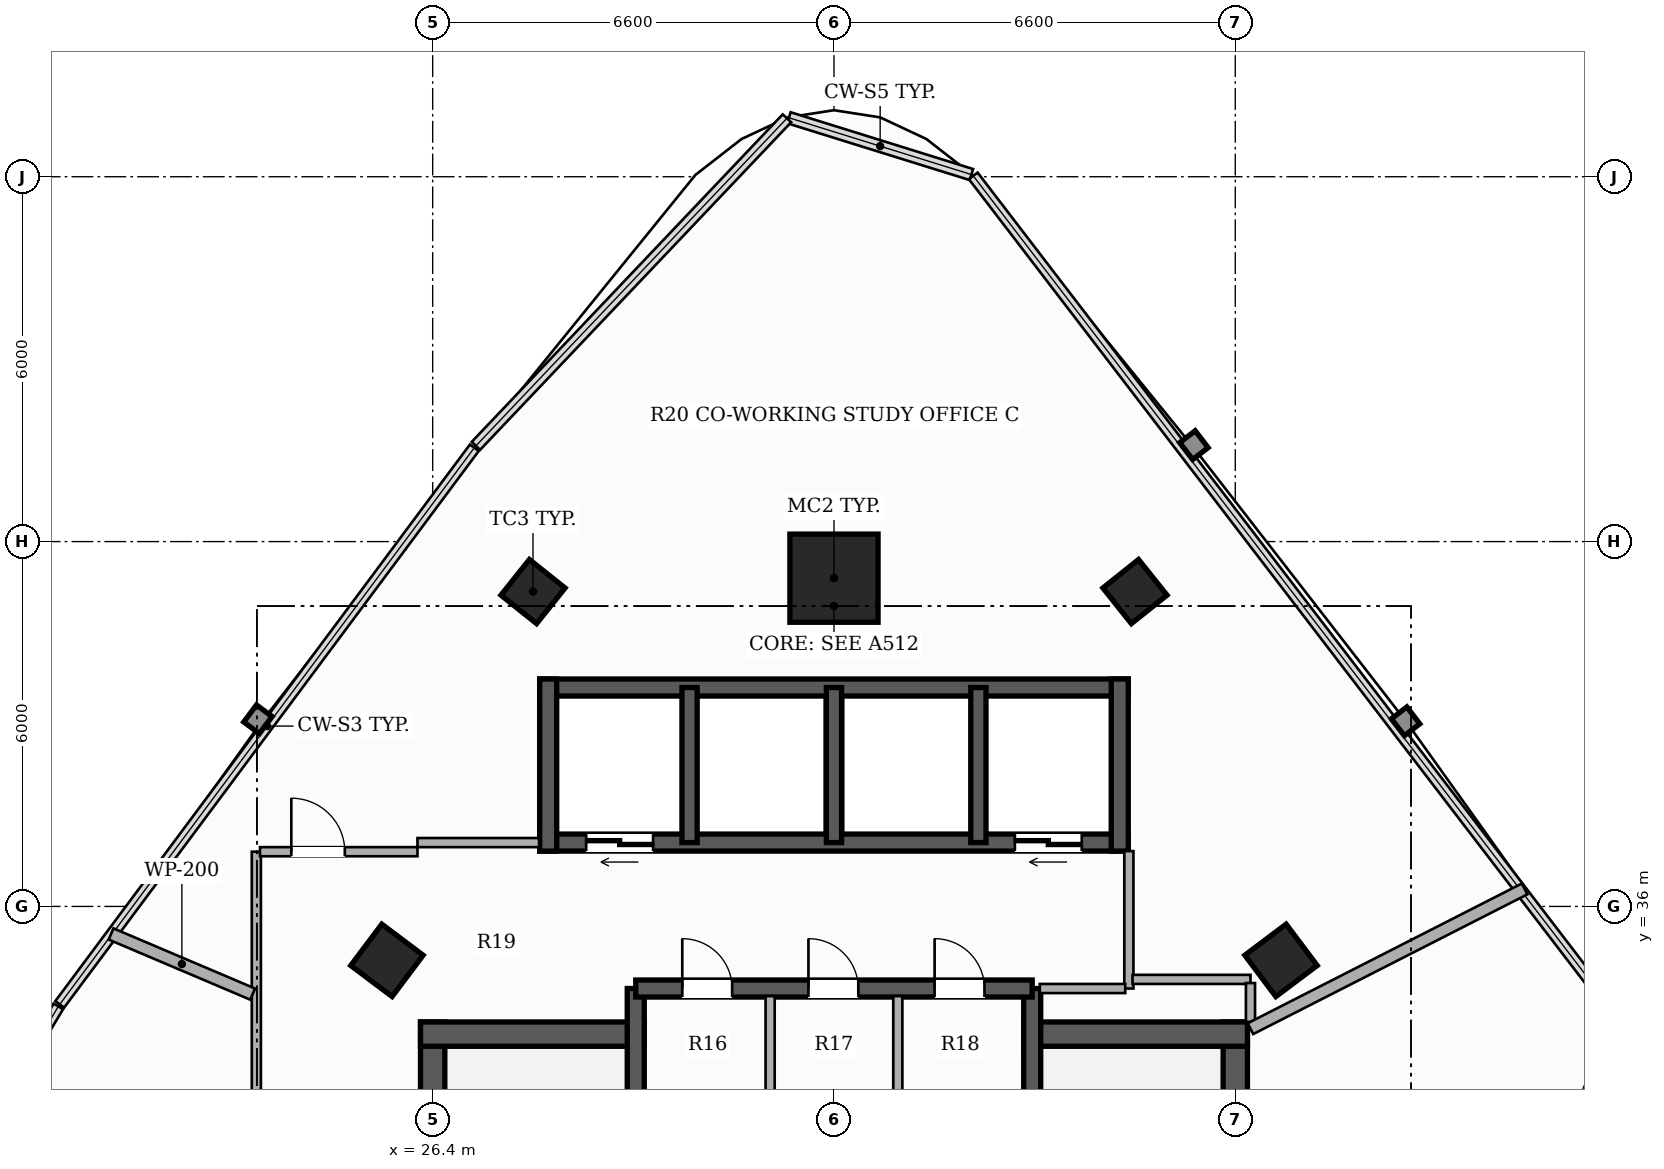
"""IFC4 building model, lengths in metres.
Left out: names, types, materials, properties, quantities, classifications, styles, units other than length and angle.
Written with IfcOpenShell. Run it as: python <this file> out.ifc"""

import sys

from ifc_helpers import new_model, si_unit, direction, frame, frame_2d, origin, origin_2d, place, context, subcontext, project, spatial, rectangle, hollow_rectangle, extrude, element, fill, save


model = new_model("IFC4")
c1 = context("Model", 3, precision=1e-05, world=origin(), true_north=direction((0.0, 1.0)))
c2 = subcontext(c1, "Body", "Model", "MODEL_VIEW")
j1 = project(units=[si_unit("LENGTHUNIT", "METRE"), si_unit("PLANEANGLEUNIT", "RADIAN")], contexts=[c1])
p1 = place(None, origin())
s1 = spatial("IfcSite", under=j1, at=p1, CompositionType="ELEMENT")
p2 = place(p1, origin())
s2 = spatial("IfcBuilding", under=s1, at=p2, CompositionType="ELEMENT")
p3 = place(p2, frame((0.0, 0.0, 126.5)))
s3 = spatial("IfcBuildingStorey", under=s2, at=p3, CompositionType="ELEMENT", Elevation=126.5)
p4 = place(p3, frame((26.4, 26.5, 0.0), z_axis=(0.0, 0.0, 1.0), x_axis=(0.0, 1.0, 0.0)))
e1 = element("IfcWall", 1, at=p4, inside=s3, PredefinedType="SHEAR", context=c2, shape_type="SweptSolid", body=[
    extrude(rectangle(XDim=7.6, YDim=0.4, at=frame_2d((3.8, 0.0))), origin(), (0.0, 0.0, 1.0), 3.3),
])
p5 = place(p3, frame((26.2, 33.9, 0.0), z_axis=(0.0, 0.0, 1.0), x_axis=(1.0, 0.0, 0.0)))
e2 = element("IfcWall", 2, at=p5, inside=s3, PredefinedType="SHEAR", context=c2, shape_type="SweptSolid", body=[
    extrude(rectangle(XDim=3.68, YDim=0.4, at=frame_2d((1.84, 0.0))), origin(), (0.0, 0.0, 1.0), 3.3),
])
p6 = place(p3, frame((39.6, 26.5, 0.0), z_axis=(0.0, 0.0, 1.0), x_axis=(0.0, 1.0, 0.0)))
e3 = element("IfcWall", 3, at=p6, inside=s3, PredefinedType="SHEAR", context=c2, shape_type="SweptSolid", body=[
    extrude(rectangle(XDim=7.6, YDim=0.4, at=frame_2d((3.8, 0.0))), origin(), (0.0, 0.0, 1.0), 3.3),
])
p7 = place(p3, frame((36.12, 33.9, 0.0), z_axis=(0.0, 0.0, 1.0), x_axis=(1.0, 0.0, 0.0)))
e4 = element("IfcWall", 4, at=p7, inside=s3, PredefinedType="SHEAR", context=c2, shape_type="SweptSolid", body=[
    extrude(rectangle(XDim=3.68, YDim=0.4, at=frame_2d((1.84, 0.0))), origin(), (0.0, 0.0, 1.0), 3.3),
])
p8 = place(p3, frame((29.74, 26.5, 0.0), z_axis=(0.0, 0.0, 1.0), x_axis=(0.0, 1.0, 0.0)))
e5 = element("IfcWall", 5, at=p8, inside=s3, PredefinedType="SHEAR", context=c2, shape_type="SweptSolid", body=[
    extrude(rectangle(XDim=8.15, YDim=0.28, at=frame_2d((4.075, 0.0))), origin(), (0.0, 0.0, 1.0), 3.3),
])
p9 = place(p8, frame((0.6, 0.0, 0.0)))
e6 = element("IfcOpeningElement", 6, at=p9, cuts=e5, PredefinedType="OPENING", context=c2, shape_type="SweptSolid", body=[
    extrude(rectangle(XDim=1.05, YDim=2.15, at=frame_2d((0.525, 1.075))), frame((0.0, 0.15, 0.0), z_axis=(0.0, -1.0, 0.0), x_axis=(1.0, 0.0, 0.0)), (0.0, 0.0, 1.0), 0.3),
])
p10 = place(p3, frame((36.26, 26.5, 0.0), z_axis=(0.0, 0.0, 1.0), x_axis=(0.0, 1.0, 0.0)))
e7 = element("IfcWall", 7, at=p10, inside=s3, PredefinedType="SHEAR", context=c2, shape_type="SweptSolid", body=[
    extrude(rectangle(XDim=8.15, YDim=0.28, at=frame_2d((4.075, 0.0))), origin(), (0.0, 0.0, 1.0), 3.3),
])
p11 = place(p10, frame((0.6, 0.0, 0.0)))
e8 = element("IfcOpeningElement", 8, at=p11, cuts=e7, PredefinedType="OPENING", context=c2, shape_type="SweptSolid", body=[
    extrude(rectangle(XDim=1.05, YDim=2.15, at=frame_2d((0.525, 1.075))), frame((0.0, 0.15, 0.0), z_axis=(0.0, -1.0, 0.0), x_axis=(1.0, 0.0, 0.0)), (0.0, 0.0, 1.0), 0.3),
])
p12 = place(p3, frame((29.74, 34.65, 0.0), z_axis=(0.0, 0.0, 1.0), x_axis=(1.0, 0.0, 0.0)))
e9 = element("IfcWall", 9, at=p12, inside=s3, PredefinedType="SHEAR", context=c2, shape_type="SweptSolid", body=[
    extrude(rectangle(XDim=6.52, YDim=0.28, at=frame_2d((3.26, 0.0))), origin(), (0.0, 0.0, 1.0), 3.3),
])
p13 = place(p12, frame((0.765, 0.0, 0.0)))
e10 = element("IfcOpeningElement", 10, at=p13, cuts=e9, PredefinedType="OPENING", context=c2, shape_type="SweptSolid", body=[
    extrude(rectangle(XDim=0.82, YDim=2.1, at=frame_2d((0.41, 1.05))), frame((0.0, 0.15, 0.0), z_axis=(0.0, -1.0, 0.0), x_axis=(1.0, 0.0, 0.0)), (0.0, 0.0, 1.0), 0.3),
])
p14 = place(p12, frame((2.84, 0.0, 0.0)))
e11 = element("IfcOpeningElement", 11, at=p14, cuts=e9, PredefinedType="OPENING", context=c2, shape_type="SweptSolid", body=[
    extrude(rectangle(XDim=0.82, YDim=2.1, at=frame_2d((0.41, 1.05))), frame((0.0, 0.15, 0.0), z_axis=(0.0, -1.0, 0.0), x_axis=(1.0, 0.0, 0.0)), (0.0, 0.0, 1.0), 0.3),
])
p15 = place(p12, frame((4.915, 0.0, 0.0)))
e12 = element("IfcOpeningElement", 12, at=p15, cuts=e9, PredefinedType="OPENING", context=c2, shape_type="SweptSolid", body=[
    extrude(rectangle(XDim=0.82, YDim=2.1, at=frame_2d((0.41, 1.05))), frame((0.0, 0.15, 0.0), z_axis=(0.0, -1.0, 0.0), x_axis=(1.0, 0.0, 0.0)), (0.0, 0.0, 1.0), 0.3),
])
p16 = place(p3, frame((37.84, 37.05, 0.0), z_axis=(0.0, 0.0, 1.0), x_axis=(-1.0, 0.0, 0.0)))
e13 = element("IfcWall", 13, at=p16, inside=s3, PredefinedType="SHEAR", context=c2, shape_type="SweptSolid", body=[
    extrude(rectangle(XDim=9.68, YDim=0.28, at=frame_2d((4.84, 0.0))), origin(), (0.0, 0.0, 1.0), 3.3),
])
p17 = place(p16, frame((7.815, 0.0, 0.0)))
e14 = element("IfcOpeningElement", 14, at=p17, cuts=e13, PredefinedType="OPENING", context=c2, shape_type="SweptSolid", body=[
    extrude(rectangle(XDim=1.1, YDim=2.2, at=frame_2d((0.55, 1.1))), frame((0.0, 0.15, 0.0), z_axis=(0.0, -1.0, 0.0), x_axis=(1.0, 0.0, 0.0)), (0.0, 0.0, 1.0), 0.3),
])
p18 = place(p16, frame((0.765, 0.0, 0.0)))
e15 = element("IfcOpeningElement", 15, at=p18, cuts=e13, PredefinedType="OPENING", context=c2, shape_type="SweptSolid", body=[
    extrude(rectangle(XDim=1.1, YDim=2.2, at=frame_2d((0.55, 1.1))), frame((0.0, 0.15, 0.0), z_axis=(0.0, -1.0, 0.0), x_axis=(1.0, 0.0, 0.0)), (0.0, 0.0, 1.0), 0.3),
])
p19 = place(p3, frame((28.16, 39.6, 0.0), z_axis=(0.0, 0.0, 1.0), x_axis=(1.0, 0.0, 0.0)))
e16 = element("IfcWall", 16, at=p19, inside=s3, PredefinedType="SHEAR", context=c2, shape_type="SweptSolid", body=[
    extrude(rectangle(XDim=9.68, YDim=0.28, at=frame_2d((4.84, 0.0))), origin(), (0.0, 0.0, 1.0), 3.3),
])
for number, where, z_axis, x_axis in (
    (17, (28.3, 36.91, 0.0), (0.0, 0.0, 1.0), (0.0, 1.0, 0.0)),
    (18, (37.7, 36.91, 0.0), (0.0, 0.0, 1.0), (0.0, 1.0, 0.0)),
):
    element("IfcWall", number, at=place(p3, frame(where, z_axis=z_axis, x_axis=x_axis)), inside=s3, PredefinedType="SHEAR", context=c2, shape_type="SweptSolid", body=[
        extrude(rectangle(XDim=2.83, YDim=0.28, at=frame_2d((1.415, 0.0))), origin(), (0.0, 0.0, 1.0), 3.3),
    ])
for number, where, z_axis, x_axis in (
    (19, (30.625, 37.05, 0.0), (0.0, 0.0, 1.0), (0.0, 1.0, 0.0)),
    (20, (33.0, 37.05, 0.0), (0.0, 0.0, 1.0), (0.0, 1.0, 0.0)),
    (21, (35.375, 37.05, 0.0), (0.0, 0.0, 1.0), (0.0, 1.0, 0.0)),
):
    element("IfcWall", number, at=place(p3, frame(where, z_axis=z_axis, x_axis=x_axis)), inside=s3, PredefinedType="SHEAR", context=c2, shape_type="SweptSolid", body=[
        extrude(rectangle(XDim=2.55, YDim=0.25, at=frame_2d((1.275, 0.0))), origin(), (0.0, 0.0, 1.0), 3.3),
    ])
p20 = place(p3, frame((33.0, 41.398, 0.0), z_axis=(0.0, 0.0, 1.0), x_axis=(1.0, 0.0, 0.0)))
e22 = element("IfcColumn", 22, at=p20, inside=s3, PredefinedType="COLUMN", context=c2, shape_type="SweptSolid", body=[
    extrude(hollow_rectangle(XDim=1.45, YDim=1.45, WallThickness=0.045, at=origin_2d()), origin(), (0.0, 0.0, 1.0), 3.3),
])
for number, where, z_axis, x_axis in (
    (23, (25.648, 35.113, 0.0), (0.0, 0.0, 1.0), (0.6, 0.8, 0.0)),
    (24, (40.352, 35.113, 0.0), (0.0, 0.0, 1.0), (-0.6, 0.8, 0.0)),
):
    element("IfcColumn", number, at=place(p3, frame(where, z_axis=z_axis, x_axis=x_axis)), inside=s3, PredefinedType="COLUMN", context=c2, shape_type="SweptSolid", body=[
        extrude(hollow_rectangle(XDim=0.85, YDim=0.85, WallThickness=0.028, at=origin_2d()), origin(), (0.0, 0.0, 1.0), 3.3),
    ])
for number, where, z_axis, x_axis in (
    (25, (28.05, 41.178, 0.0), (0.0, 0.0, 1.0), (0.624, 0.782, 0.0)),
    (26, (37.95, 41.178, 0.0), (0.0, 0.0, 1.0), (-0.624, 0.782, 0.0)),
):
    element("IfcColumn", number, at=place(p3, frame(where, z_axis=z_axis, x_axis=x_axis)), inside=s3, PredefinedType="COLUMN", context=c2, shape_type="SweptSolid", body=[
        extrude(hollow_rectangle(XDim=0.75, YDim=0.75, WallThickness=0.025, at=origin_2d()), origin(), (0.0, 0.0, 1.0), 3.3),
    ])
p21 = place(p3, frame((37.85, 34.65, 0.0), z_axis=(0.0, 0.0, 1.0), x_axis=(0.0, 1.0, 0.0)))
e27 = element("IfcWall", 27, at=p21, inside=s3, PredefinedType="PARTITIONING", context=c2, shape_type="SweptSolid", body=[
    extrude(rectangle(XDim=2.26, YDim=0.15, at=frame_2d((1.13, 0.0))), origin(), (0.0, 0.0, 1.0), 3.06),
])
p22 = place(p3, frame((36.385, 34.65, 0.0), z_axis=(0.0, 0.0, 1.0), x_axis=(1.0, 0.0, 0.0)))
e28 = element("IfcWall", 28, at=p22, inside=s3, PredefinedType="PARTITIONING", context=c2, shape_type="SweptSolid", body=[
    extrude(rectangle(XDim=1.405, YDim=0.15, at=frame_2d((0.703, 0.0))), origin(), (0.0, 0.0, 1.0), 2.425),
])
for number, where, z_axis, x_axis in (
    (29, (31.95, 32.915, 0.0), (0.0, 0.0, 1.0), (0.0, 1.0, 0.0)),
    (30, (34.05, 32.915, 0.0), (0.0, 0.0, 1.0), (0.0, 1.0, 0.0)),
):
    element("IfcWall", number, at=place(p3, frame(where, z_axis=z_axis, x_axis=x_axis)), inside=s3, PredefinedType="PARTITIONING", context=c2, shape_type="SweptSolid", body=[
        extrude(rectangle(XDim=1.61, YDim=0.15, at=frame_2d((0.805, 0.0))), origin(), (0.0, 0.0, 1.0), 3.06),
    ])
p23 = place(p3, frame((23.5, 14.06, 0.0), z_axis=(0.0, 0.0, 1.0), x_axis=(0.0, 1.0, 0.0)))
e31 = element("IfcWall", 31, at=p23, inside=s3, PredefinedType="PARTITIONING", context=c2, shape_type="SweptSolid", body=[
    extrude(rectangle(XDim=22.84, YDim=0.15, at=frame_2d((11.42, 0.0))), origin(), (0.0, 0.0, 1.0), 2.413),
])
p24 = place(p23, frame((13.045, 0.0, 0.0)))
e32 = element("IfcOpeningElement", 32, at=p24, cuts=e31, PredefinedType="OPENING", context=c2, shape_type="SweptSolid", body=[
    extrude(rectangle(XDim=0.88, YDim=2.1, at=frame_2d((0.44, 1.05))), frame((0.0, 0.085, 0.0), z_axis=(0.0, -1.0, 0.0), x_axis=(1.0, 0.0, 0.0)), (0.0, 0.0, 1.0), 0.17),
])
p25 = place(p23, frame((2.977, 0.0, 0.0)))
e33 = element("IfcOpeningElement", 33, at=p25, cuts=e31, PredefinedType="OPENING", context=c2, shape_type="SweptSolid", body=[
    extrude(rectangle(XDim=0.92, YDim=2.15, at=frame_2d((0.46, 1.075))), frame((0.0, 0.085, 0.0), z_axis=(0.0, -1.0, 0.0), x_axis=(1.0, 0.0, 0.0)), (0.0, 0.0, 1.0), 0.17),
])
p26 = place(p3, frame((23.56, 36.9, 0.0), z_axis=(0.0, 0.0, 1.0), x_axis=(1.0, 0.0, 0.0)))
e34 = element("IfcWall", 34, at=p26, inside=s3, PredefinedType="PARTITIONING", context=c2, shape_type="SweptSolid", body=[
    extrude(rectangle(XDim=2.59, YDim=0.15, at=frame_2d((1.295, 0.0))), origin(), (0.0, 0.0, 1.0), 2.413),
])
p27 = place(p26, frame((0.515, 0.0, 0.0)))
e35 = element("IfcOpeningElement", 35, at=p27, cuts=e34, PredefinedType="OPENING", context=c2, shape_type="SweptSolid", body=[
    extrude(rectangle(XDim=0.88, YDim=2.1, at=frame_2d((0.44, 1.05))), frame((0.0, 0.085, 0.0), z_axis=(0.0, -1.0, 0.0), x_axis=(1.0, 0.0, 0.0)), (0.0, 0.0, 1.0), 0.17),
])
p28 = place(p3, frame((26.15, 37.05, 0.0), z_axis=(0.0, 0.0, 1.0), x_axis=(1.0, 0.0, 0.0)))
e36 = element("IfcWall", 36, at=p28, inside=s3, PredefinedType="PARTITIONING", context=c2, shape_type="SweptSolid", body=[
    extrude(rectangle(XDim=2.0, YDim=0.15, at=frame_2d((1.0, 0.0))), origin(), (0.0, 0.0, 1.0), 2.413),
])
p29 = place(p3, frame((37.91, 34.8, 0.0), z_axis=(0.0, 0.0, 1.0), x_axis=(1.0, 0.0, 0.0)))
e37 = element("IfcWall", 37, at=p29, inside=s3, PredefinedType="PARTITIONING", context=c2, shape_type="SweptSolid", body=[
    extrude(rectangle(XDim=1.94, YDim=0.15, at=frame_2d((0.97, 0.0))), origin(), (0.0, 0.0, 1.0), 2.721),
])
p30 = place(p3, frame((39.85, 34.74, 0.0), z_axis=(0.0, 0.0, 1.0), x_axis=(0.0, -1.0, 0.0)))
e38 = element("IfcWall", 38, at=p30, inside=s3, PredefinedType="PARTITIONING", context=c2, shape_type="SweptSolid", body=[
    extrude(rectangle(XDim=0.64, YDim=0.15, at=frame_2d((0.32, 0.0))), origin(), (0.0, 0.0, 1.0), 2.721),
])
p31 = place(p3, frame((21.111, 35.547, 0.0), z_axis=(0.0, 0.0, 1.0), x_axis=(0.920437694564, -0.390889307126, 0.0)))
e39 = element("IfcWall", 39, at=p31, inside=s3, PredefinedType="PARTITIONING", context=c2, shape_type="SweptSolid", body=[
    extrude(rectangle(XDim=2.53, YDim=0.2, at=frame_2d((1.265, 0.0))), origin(), (0.0, 0.0, 1.0), 3.06),
])
p32 = place(p3, frame((44.359, 36.288, 0.0), z_axis=(0.0, 0.0, 1.0), x_axis=(-0.890946333403, -0.454108611453, 0.0)))
e40 = element("IfcWall", 40, at=p32, inside=s3, PredefinedType="PARTITIONING", context=c2, shape_type="SweptSolid", body=[
    extrude(rectangle(XDim=5.061, YDim=0.2, at=frame_2d((2.53, 0.0))), origin(), (0.0, 0.0, 1.0), 2.413),
])
p33 = place(p17, origin())
e41 = element("IfcDoor", 41, at=p33, inside=s3, OperationType="DOUBLE_DOOR_SLIDING", PredefinedType="DOOR", context=c2, shape_type="SweptSolid", body=[
    extrude(rectangle(XDim=1.1, YDim=2.2, at=frame_2d((0.55, 1.1))), frame((0.0, 0.025, 0.0), z_axis=(0.0, -1.0, 0.0), x_axis=(1.0, 0.0, 0.0)), (0.0, 0.0, 1.0), 0.05),
])
fill(e14, e41)
p34 = place(p18, origin())
e42 = element("IfcDoor", 42, at=p34, inside=s3, OperationType="DOUBLE_DOOR_SLIDING", PredefinedType="DOOR", context=c2, shape_type="SweptSolid", body=[
    extrude(rectangle(XDim=1.1, YDim=2.2, at=frame_2d((0.55, 1.1))), frame((0.0, 0.025, 0.0), z_axis=(0.0, -1.0, 0.0), x_axis=(1.0, 0.0, 0.0)), (0.0, 0.0, 1.0), 0.05),
])
fill(e15, e42)
p35 = place(p13, origin())
e43 = element("IfcDoor", 43, at=p35, inside=s3, OperationType="SINGLE_SWING_LEFT", PredefinedType="DOOR", context=c2, shape_type="SweptSolid", body=[
    extrude(rectangle(XDim=0.82, YDim=2.1, at=frame_2d((0.41, 1.05))), frame((0.0, 0.025, 0.0), z_axis=(0.0, -1.0, 0.0), x_axis=(1.0, 0.0, 0.0)), (0.0, 0.0, 1.0), 0.05),
])
fill(e10, e43)
p36 = place(p14, origin())
e44 = element("IfcDoor", 44, at=p36, inside=s3, OperationType="SINGLE_SWING_LEFT", PredefinedType="DOOR", context=c2, shape_type="SweptSolid", body=[
    extrude(rectangle(XDim=0.82, YDim=2.1, at=frame_2d((0.41, 1.05))), frame((0.0, 0.025, 0.0), z_axis=(0.0, -1.0, 0.0), x_axis=(1.0, 0.0, 0.0)), (0.0, 0.0, 1.0), 0.05),
])
fill(e11, e44)
p37 = place(p15, origin())
e45 = element("IfcDoor", 45, at=p37, inside=s3, OperationType="SINGLE_SWING_LEFT", PredefinedType="DOOR", context=c2, shape_type="SweptSolid", body=[
    extrude(rectangle(XDim=0.82, YDim=2.1, at=frame_2d((0.41, 1.05))), frame((0.0, 0.025, 0.0), z_axis=(0.0, -1.0, 0.0), x_axis=(1.0, 0.0, 0.0)), (0.0, 0.0, 1.0), 0.05),
])
fill(e12, e45)
p38 = place(p27, origin())
e46 = element("IfcDoor", 46, at=p38, inside=s3, OperationType="SINGLE_SWING_LEFT", PredefinedType="DOOR", context=c2, shape_type="SweptSolid", body=[
    extrude(rectangle(XDim=0.88, YDim=2.1, at=frame_2d((0.44, 1.05))), frame((0.0, 0.025, 0.0), z_axis=(0.0, -1.0, 0.0), x_axis=(1.0, 0.0, 0.0)), (0.0, 0.0, 1.0), 0.05),
])
fill(e35, e46)
save(model, sys.argv[1])
